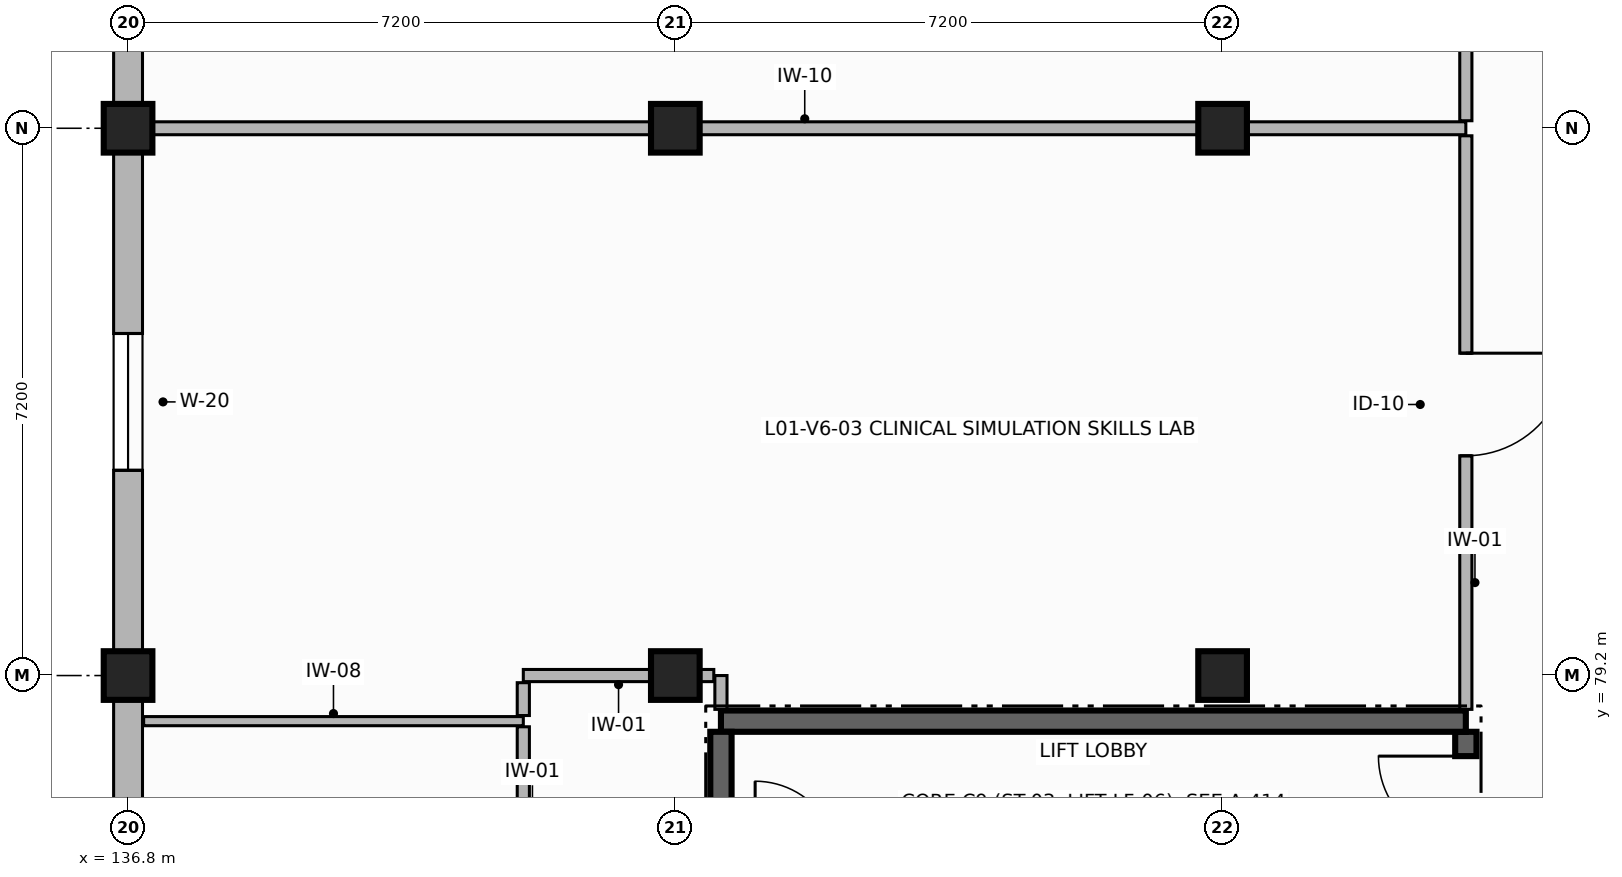
"""IFC4 building model, lengths in metres.
Left out: names, types, materials, properties, quantities, classifications, styles, units other than length and angle.
Written with IfcOpenShell. Run it as: python <this file> out.ifc"""

import sys

from ifc_helpers import new_model, si_unit, direction, frame, frame_2d, origin, origin_2d, place, context, subcontext, project, spatial, rectangle, extrude, element, fill, save


model = new_model("IFC4")
c1 = context("Model", 3, precision=1e-05, world=origin(), true_north=direction((0.0, 1.0)))
c2 = subcontext(c1, "Body", "Model", "MODEL_VIEW")
j1 = project(units=[si_unit("LENGTHUNIT", "METRE"), si_unit("PLANEANGLEUNIT", "RADIAN")], contexts=[c1])
p1 = place(None, origin())
s1 = spatial("IfcSite", under=j1, at=p1, CompositionType="ELEMENT")
p2 = place(p1, origin())
s2 = spatial("IfcBuilding", under=s1, at=p2, CompositionType="ELEMENT")
p3 = place(p2, frame((0.0, 0.0, 4.5)))
s3 = spatial("IfcBuildingStorey", under=s2, at=p3, CompositionType="ELEMENT", Elevation=4.5)
for number, where, z_axis, x_axis in (
    (1, (136.8, 79.2, 0.0), (0.0, 0.0, 1.0), (1.0, 0.0, 0.0)),
    (2, (136.8, 86.4, 0.0), (0.0, 0.0, 1.0), (1.0, 0.0, 0.0)),
    (3, (144.0, 79.2, 0.0), (0.0, 0.0, 1.0), (1.0, 0.0, 0.0)),
    (4, (144.0, 86.4, 0.0), (0.0, 0.0, 1.0), (1.0, 0.0, 0.0)),
    (5, (151.2, 79.2, 0.0), (0.0, 0.0, 1.0), (1.0, 0.0, 0.0)),
    (6, (151.2, 86.4, 0.0), (0.0, 0.0, 1.0), (1.0, 0.0, 0.0)),
):
    element("IfcColumn", number, at=place(p3, frame(where, z_axis=z_axis, x_axis=x_axis)), inside=s3, PredefinedType="COLUMN", context=c2, shape_type="SweptSolid", body=[
        extrude(rectangle(XDim=0.64, YDim=0.64, at=origin_2d()), origin(), (0.0, 0.0, 1.0), 3.58),
    ])
p4 = place(p3, frame((136.8, 93.6, 0.0), z_axis=(0.0, 0.0, 1.0), x_axis=(0.0, -1.0, 0.0)))
e7 = element("IfcWall", 7, at=p4, inside=s3, PredefinedType="SOLIDWALL", context=c2, shape_type="SweptSolid", body=[
    extrude(rectangle(XDim=7.2, YDim=0.38, at=frame_2d((3.6, 0.0))), origin(), (0.0, 0.0, 1.0), 2.91),
])
p5 = place(p4, frame((2.7, 0.0, 0.85)))
e8 = element("IfcOpeningElement", 8, at=p5, cuts=e7, PredefinedType="OPENING", context=c2, shape_type="SweptSolid", body=[
    extrude(rectangle(XDim=1.8, YDim=1.85, at=frame_2d((0.9, 0.925))), frame((0.0, 0.2, 0.0), z_axis=(0.0, -1.0, 0.0), x_axis=(1.0, 0.0, 0.0)), (0.0, 0.0, 1.0), 0.4),
])
p6 = place(p3, frame((136.8, 86.4, 0.0), z_axis=(0.0, 0.0, 1.0), x_axis=(0.0, -1.0, 0.0)))
e9 = element("IfcWall", 9, at=p6, inside=s3, PredefinedType="SOLIDWALL", context=c2, shape_type="SweptSolid", body=[
    extrude(rectangle(XDim=7.2, YDim=0.38, at=frame_2d((3.6, 0.0))), origin(), (0.0, 0.0, 1.0), 2.91),
])
p7 = place(p6, frame((2.7, 0.0, 0.85)))
e10 = element("IfcOpeningElement", 10, at=p7, cuts=e9, PredefinedType="OPENING", context=c2, shape_type="SweptSolid", body=[
    extrude(rectangle(XDim=1.8, YDim=1.85, at=frame_2d((0.9, 0.925))), frame((0.0, 0.2, 0.0), z_axis=(0.0, -1.0, 0.0), x_axis=(1.0, 0.0, 0.0)), (0.0, 0.0, 1.0), 0.4),
])
p8 = place(p3, frame((136.8, 79.2, 0.0), z_axis=(0.0, 0.0, 1.0), x_axis=(0.0, -1.0, 0.0)))
e11 = element("IfcWall", 11, at=p8, inside=s3, PredefinedType="SOLIDWALL", context=c2, shape_type="SweptSolid", body=[
    extrude(rectangle(XDim=7.2, YDim=0.38, at=frame_2d((3.6, 0.0))), origin(), (0.0, 0.0, 1.0), 2.91),
])
p9 = place(p8, frame((2.6, 0.0, 0.85)))
e12 = element("IfcOpeningElement", 12, at=p9, cuts=e11, PredefinedType="OPENING", context=c2, shape_type="SweptSolid", body=[
    extrude(rectangle(XDim=1.8, YDim=1.85, at=frame_2d((0.9, 0.925))), frame((0.0, 0.2, 0.0), z_axis=(0.0, -1.0, 0.0), x_axis=(1.0, 0.0, 0.0)), (0.0, 0.0, 1.0), 0.4),
])
p10 = place(p3, frame((154.4, 72.94, 0.0), z_axis=(0.0, 0.0, 1.0), x_axis=(0.0, 1.0, 0.0)))
e13 = element("IfcWall", 13, at=p10, inside=s3, PredefinedType="SHEAR", context=c2, shape_type="SweptSolid", body=[
    extrude(rectangle(XDim=5.52, YDim=0.28, at=frame_2d((2.76, 0.0))), origin(), (0.0, 0.0, 1.0), 3.58),
])
p11 = place(p10, frame((4.05, 0.0, 0.0)))
e14 = element("IfcOpeningElement", 14, at=p11, cuts=e13, PredefinedType="OPENING", context=c2, shape_type="SweptSolid", body=[
    extrude(rectangle(XDim=1.15, YDim=2.2, at=frame_2d((0.575, 1.1))), frame((0.0, 0.15, 0.0), z_axis=(0.0, -1.0, 0.0), x_axis=(1.0, 0.0, 0.0)), (0.0, 0.0, 1.0), 0.3),
])
p12 = place(p3, frame((154.4, 78.6, 0.0), z_axis=(0.0, 0.0, 1.0), x_axis=(-1.0, 0.0, 0.0)))
e15 = element("IfcWall", 15, at=p12, inside=s3, PredefinedType="SHEAR", context=c2, shape_type="SweptSolid", body=[
    extrude(rectangle(XDim=9.8, YDim=0.28, at=frame_2d((4.9, 0.0))), origin(), (0.0, 0.0, 1.0), 3.58),
])
p13 = place(p3, frame((144.6, 78.46, 0.0), z_axis=(0.0, 0.0, 1.0), x_axis=(0.0, -1.0, 0.0)))
e16 = element("IfcWall", 16, at=p13, inside=s3, PredefinedType="SHEAR", context=c2, shape_type="SweptSolid", body=[
    extrude(rectangle(XDim=5.52, YDim=0.28, at=frame_2d((2.76, 0.0))), origin(), (0.0, 0.0, 1.0), 3.58),
])
p14 = place(p3, frame((137.005, 78.6, 0.0), z_axis=(0.0, 0.0, 1.0), x_axis=(1.0, 0.0, 0.0)))
e17 = element("IfcWall", 17, at=p14, inside=s3, PredefinedType="PARTITIONING", context=c2, shape_type="SweptSolid", body=[
    extrude(rectangle(XDim=4.995, YDim=0.12, at=frame_2d((2.498, 0.0))), origin(), (0.0, 0.0, 1.0), 2.89),
])
p15 = place(p3, frame((142.0, 78.526, 0.0), z_axis=(0.0, 0.0, 1.0), x_axis=(0.0, -1.0, 0.0)))
e18 = element("IfcWall", 18, at=p15, inside=s3, PredefinedType="PARTITIONING", context=c2, shape_type="SweptSolid", body=[
    extrude(rectangle(XDim=5.726, YDim=0.16, at=frame_2d((2.863, 0.0))), origin(), (0.0, 0.0, 1.0), 2.89),
])
p16 = place(p15, frame((2.302, 0.0, 0.0)))
e19 = element("IfcOpeningElement", 19, at=p16, cuts=e18, PredefinedType="OPENING", context=c2, shape_type="SweptSolid", body=[
    extrude(rectangle(XDim=1.35, YDim=2.25, at=frame_2d((0.675, 1.125))), frame((0.0, 0.09, 0.0), z_axis=(0.0, -1.0, 0.0), x_axis=(1.0, 0.0, 0.0)), (0.0, 0.0, 1.0), 0.18),
])
p17 = place(p3, frame((144.6, 78.755, 0.0), z_axis=(0.0, 0.0, 1.0), x_axis=(0.0, 1.0, 0.0)))
e20 = element("IfcWall", 20, at=p17, inside=s3, PredefinedType="PARTITIONING", context=c2, shape_type="SweptSolid", body=[
    extrude(rectangle(XDim=0.445, YDim=0.16, at=frame_2d((0.223, 0.0))), origin(), (0.0, 0.0, 1.0), 2.89),
])
p18 = place(p3, frame((144.506, 79.2, 0.0), z_axis=(0.0, 0.0, 1.0), x_axis=(-1.0, 0.0, 0.0)))
e21 = element("IfcWall", 21, at=p18, inside=s3, PredefinedType="PARTITIONING", context=c2, shape_type="SweptSolid", body=[
    extrude(rectangle(XDim=2.506, YDim=0.16, at=frame_2d((1.253, 0.0))), origin(), (0.0, 0.0, 1.0), 2.89),
])
p19 = place(p3, frame((142.0, 79.106, 0.0), z_axis=(0.0, 0.0, 1.0), x_axis=(0.0, -1.0, 0.0)))
e22 = element("IfcWall", 22, at=p19, inside=s3, PredefinedType="PARTITIONING", context=c2, shape_type="SweptSolid", body=[
    extrude(rectangle(XDim=0.432, YDim=0.16, at=frame_2d((0.216, 0.0))), origin(), (0.0, 0.0, 1.0), 2.89),
])
p20 = place(p3, frame((137.005, 86.4, 0.0), z_axis=(0.0, 0.0, 1.0), x_axis=(1.0, 0.0, 0.0)))
e23 = element("IfcWall", 23, at=p20, inside=s3, PredefinedType="PARTITIONING", context=c2, shape_type="SweptSolid", body=[
    extrude(rectangle(XDim=17.395, YDim=0.17, at=frame_2d((8.698, 0.0))), origin(), (0.0, 0.0, 1.0), 2.89),
])
p21 = place(p3, frame((154.4, 86.301, 0.0), z_axis=(0.0, 0.0, 1.0), x_axis=(0.0, -1.0, 0.0)))
e24 = element("IfcWall", 24, at=p21, inside=s3, PredefinedType="PARTITIONING", context=c2, shape_type="SweptSolid", body=[
    extrude(rectangle(XDim=7.546, YDim=0.16, at=frame_2d((3.773, 0.0))), origin(), (0.0, 0.0, 1.0), 2.89),
])
p22 = place(p21, frame((2.86, 0.0, 0.0)))
e25 = element("IfcOpeningElement", 25, at=p22, cuts=e24, PredefinedType="OPENING", context=c2, shape_type="SweptSolid", body=[
    extrude(rectangle(XDim=1.35, YDim=2.25, at=frame_2d((0.675, 1.125))), frame((0.0, 0.09, 0.0), z_axis=(0.0, -1.0, 0.0), x_axis=(1.0, 0.0, 0.0)), (0.0, 0.0, 1.0), 0.18),
])
p23 = place(p3, frame((154.4, 93.521, 0.0), z_axis=(0.0, 0.0, 1.0), x_axis=(0.0, -1.0, 0.0)))
e26 = element("IfcWall", 26, at=p23, inside=s3, PredefinedType="PARTITIONING", context=c2, shape_type="SweptSolid", body=[
    extrude(rectangle(XDim=7.022, YDim=0.16, at=frame_2d((3.511, 0.0))), origin(), (0.0, 0.0, 1.0), 2.89),
])
p24 = place(p23, frame((3.001, 0.0, 0.0)))
e27 = element("IfcOpeningElement", 27, at=p24, cuts=e26, PredefinedType="OPENING", context=c2, shape_type="SweptSolid", body=[
    extrude(rectangle(XDim=1.02, YDim=2.15, at=frame_2d((0.51, 1.075))), frame((0.0, 0.09, 0.0), z_axis=(0.0, -1.0, 0.0), x_axis=(1.0, 0.0, 0.0)), (0.0, 0.0, 1.0), 0.18),
])
p25 = place(p7, origin())
e28 = element("IfcWindow", 28, at=p25, inside=s3, PartitioningType="SINGLE_PANEL", PredefinedType="WINDOW", context=c2, shape_type="SweptSolid", body=[
    extrude(rectangle(XDim=1.8, YDim=1.85, at=frame_2d((0.9, 0.925))), frame((0.0, 0.03, 0.0), z_axis=(0.0, -1.0, 0.0), x_axis=(1.0, 0.0, 0.0)), (0.0, 0.0, 1.0), 0.06),
])
fill(e10, e28)
p26 = place(p11, origin())
e29 = element("IfcDoor", 29, at=p26, inside=s3, OperationType="SINGLE_SWING_RIGHT", PredefinedType="DOOR", context=c2, shape_type="SweptSolid", body=[
    extrude(rectangle(XDim=1.15, YDim=2.2, at=frame_2d((0.575, 1.1))), frame((0.0, 0.025, 0.0), z_axis=(0.0, -1.0, 0.0), x_axis=(1.0, 0.0, 0.0)), (0.0, 0.0, 1.0), 0.05),
])
fill(e14, e29)
p27 = place(p22, origin())
e30 = element("IfcDoor", 30, at=p27, inside=s3, OperationType="SINGLE_SWING_LEFT", PredefinedType="DOOR", context=c2, shape_type="SweptSolid", body=[
    extrude(rectangle(XDim=1.35, YDim=2.25, at=frame_2d((0.675, 1.125))), frame((0.0, 0.025, 0.0), z_axis=(0.0, -1.0, 0.0), x_axis=(1.0, 0.0, 0.0)), (0.0, 0.0, 1.0), 0.05),
])
fill(e25, e30)
save(model, sys.argv[1])
